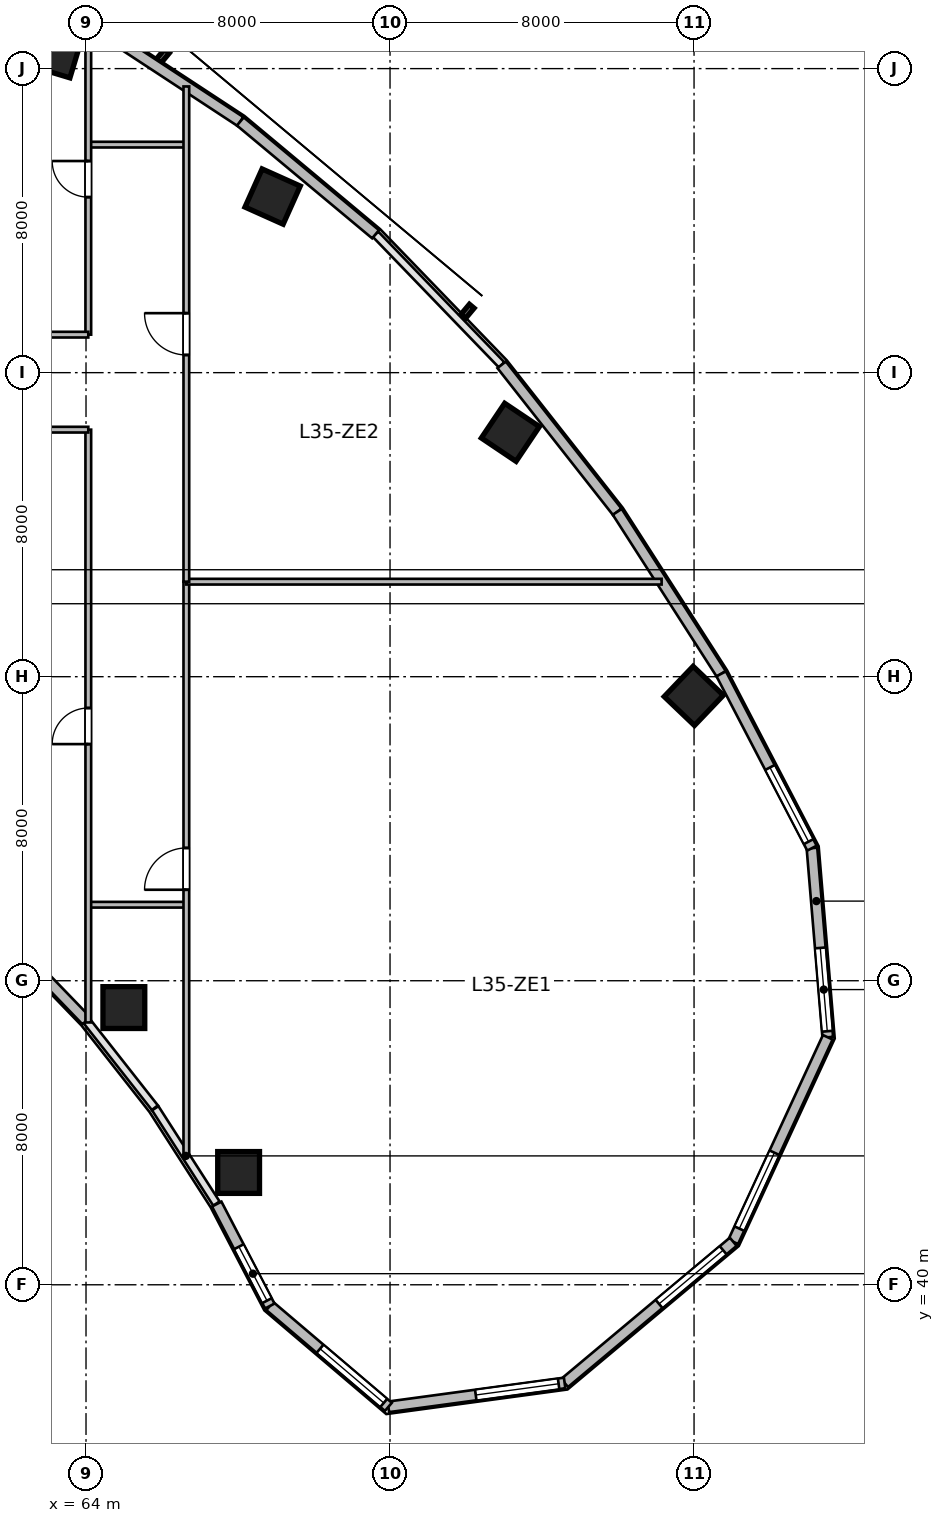
"""IFC4 building model, lengths in metres.
Left out: names, types, materials, properties, quantities, classifications, styles, units other than length and angle.
Written with IfcOpenShell. Run it as: python <this file> out.ifc"""

import sys

from ifc_helpers import new_model, si_unit, direction, frame, frame_2d, origin, origin_2d, place, context, subcontext, project, spatial, rectangle, circle, extrude, source, transform, mapped, element, fill, save


model = new_model("IFC4")
c1 = context("Model", 3, precision=1e-05, world=origin(), true_north=direction((0.0, 1.0)))
c2 = subcontext(c1, "Body", "Model", "MODEL_VIEW")
j1 = project(units=[si_unit("LENGTHUNIT", "METRE"), si_unit("PLANEANGLEUNIT", "RADIAN")], contexts=[c1])
p1 = place(None, origin())
s1 = spatial("IfcSite", under=j1, at=p1, CompositionType="ELEMENT")
p2 = place(p1, origin())
s2 = spatial("IfcBuilding", under=s1, at=p2, CompositionType="ELEMENT")
p3 = place(p2, frame((0.0, 0.0, 146.7)))
s3 = spatial("IfcBuildingStorey", under=s2, at=p3, CompositionType="ELEMENT", Elevation=146.7)
m1 = source(origin(), c2, "Body", "SweptSolid", [
    extrude(rectangle(XDim=1.1, YDim=1.1, at=origin_2d()), origin(), (0.0, 0.0, 1.0), 3.9),
])
for number, where, z_axis, x_axis in (
    (1, (63.209, 72.442, 0.0), (0.0, 0.0, 1.0), (0.289, 0.957, 0.0)),
    (2, (68.91, 68.633, 0.0), (0.0, 0.0, 1.0), (0.409, 0.912, 0.0)),
):
    element("IfcColumn", number, at=place(p3, frame(where, z_axis=z_axis, x_axis=x_axis)), inside=s3, PredefinedType="COLUMN", context=c2, shape_type="MappedRepresentation", body=[
        mapped(m1, transform((0.0, 0.0, 0.0), scale=1.0)),
    ])
m2 = source(origin(), c2, "Body", "SweptSolid", [
    extrude(circle(Radius=0.55, at=origin_2d()), origin(), (0.0, 0.0, 1.0), 3.9),
])
p4 = place(p3, frame((64.996, 47.294, 0.0), z_axis=(0.0, 0.0, 1.0), x_axis=(0.55774510898, 0.830012285095, 0.0)))
e3 = element("IfcColumn", 3, at=p4, inside=s3, PredefinedType="COLUMN", context=c2, shape_type="MappedRepresentation", body=[
    mapped(m2, transform((0.0, 0.0, 0.0), scale=1.0)),
])
p5 = place(p3, frame((75.167, 62.43, 0.0), z_axis=(0.0, 0.0, 1.0), x_axis=(0.55774510898, 0.830012285095, 0.0)))
e4 = element("IfcColumn", 4, at=p5, inside=s3, PredefinedType="COLUMN", context=c2, shape_type="MappedRepresentation", body=[
    mapped(m1, transform((0.0, 0.0, 0.0), scale=1.0)),
])
p6 = place(p3, frame((68.015, 42.955, 0.0), z_axis=(0.0, 0.0, 1.0), x_axis=(0.690756218984, 0.723087716626, 0.0)))
e5 = element("IfcColumn", 5, at=p6, inside=s3, PredefinedType="COLUMN", context=c2, shape_type="MappedRepresentation", body=[
    mapped(m2, transform((0.0, 0.0, 0.0), scale=1.0)),
])
p7 = place(p3, frame((79.993, 55.494, 0.0), z_axis=(0.0, 0.0, 1.0), x_axis=(0.690756218984, 0.723087716626, 0.0)))
e6 = element("IfcColumn", 6, at=p7, inside=s3, PredefinedType="COLUMN", context=c2, shape_type="MappedRepresentation", body=[
    mapped(m1, transform((0.0, 0.0, 0.0), scale=1.0)),
])
m3 = source(origin(), c2, "Body", "SweptSolid", [
    extrude(rectangle(XDim=4.994, YDim=0.28, at=frame_2d((2.497, 0.0))), origin(), (0.0, 0.0, 1.0), 3.65),
])
p8 = place(p3, frame((83.102, 51.489, 0.0), z_axis=(0.0, 0.0, 1.0), x_axis=(0.083344839916, -0.996520766296, 0.0)))
e7 = element("IfcWall", 7, at=p8, inside=s3, PredefinedType="SOLIDWALL", context=c2, shape_type="MappedRepresentation", body=[
    mapped(m3, transform((0.0, 0.0, 0.0), scale=1.0)),
])
p9 = place(p8, frame((2.635, 0.0, 0.95)))
e8 = element("IfcOpeningElement", 8, at=p9, cuts=e7, PredefinedType="OPENING", context=c2, shape_type="SweptSolid", body=[
    extrude(rectangle(XDim=2.2, YDim=2.1, at=frame_2d((1.1, 1.05))), frame((0.0, 0.15, 0.0), z_axis=(0.0, -1.0, 0.0), x_axis=(1.0, 0.0, 0.0)), (0.0, 0.0, 1.0), 0.3),
])
m4 = source(origin(), c2, "Body", "SweptSolid", [
    extrude(rectangle(XDim=5.927, YDim=0.28, at=frame_2d((2.964, 0.0))), origin(), (0.0, 0.0, 1.0), 3.65),
])
p10 = place(p3, frame((83.519, 46.512, 0.0), z_axis=(0.0, 0.0, 1.0), x_axis=(-0.419656204795, -0.907683132914, 0.0)))
e9 = element("IfcWall", 9, at=p10, inside=s3, PredefinedType="SOLIDWALL", context=c2, shape_type="MappedRepresentation", body=[
    mapped(m4, transform((0.0, 0.0, 0.0), scale=1.0)),
])
p11 = place(p10, frame((3.346, 0.0, 0.95)))
e10 = element("IfcOpeningElement", 10, at=p11, cuts=e9, PredefinedType="OPENING", context=c2, shape_type="SweptSolid", body=[
    extrude(rectangle(XDim=2.2, YDim=2.1, at=frame_2d((1.1, 1.05))), frame((0.0, 0.15, 0.0), z_axis=(0.0, -1.0, 0.0), x_axis=(1.0, 0.0, 0.0)), (0.0, 0.0, 1.0), 0.3),
])
m5 = source(origin(), c2, "Body", "SweptSolid", [
    extrude(rectangle(XDim=5.786, YDim=0.28, at=frame_2d((2.893, 0.0))), origin(), (0.0, 0.0, 1.0), 3.65),
])
p12 = place(p3, frame((81.031, 41.131, 0.0), z_axis=(0.0, 0.0, 1.0), x_axis=(-0.766711306852, -0.641992034176, 0.0)))
e11 = element("IfcWall", 11, at=p12, inside=s3, PredefinedType="SOLIDWALL", context=c2, shape_type="MappedRepresentation", body=[
    mapped(m5, transform((0.0, 0.0, 0.0), scale=1.0)),
])
p13 = place(p12, frame((0.347, 0.0, 0.95)))
e12 = element("IfcOpeningElement", 12, at=p13, cuts=e11, PredefinedType="OPENING", context=c2, shape_type="SweptSolid", body=[
    extrude(rectangle(XDim=2.2, YDim=2.1, at=frame_2d((1.1, 1.05))), frame((0.0, 0.15, 0.0), z_axis=(0.0, -1.0, 0.0), x_axis=(1.0, 0.0, 0.0)), (0.0, 0.0, 1.0), 0.3),
])
m6 = source(origin(), c2, "Body", "SweptSolid", [
    extrude(rectangle(XDim=4.68, YDim=0.28, at=frame_2d((2.34, 0.0))), origin(), (0.0, 0.0, 1.0), 3.65),
])
p14 = place(p3, frame((76.594, 37.417, 0.0), z_axis=(0.0, 0.0, 1.0), x_axis=(-0.990931146435, -0.134370618162, 0.0)))
e13 = element("IfcWall", 13, at=p14, inside=s3, PredefinedType="SOLIDWALL", context=c2, shape_type="MappedRepresentation", body=[
    mapped(m6, transform((0.0, 0.0, 0.0), scale=1.0)),
])
p15 = place(p14, frame((0.16, 0.0, 0.95)))
e14 = element("IfcOpeningElement", 14, at=p15, cuts=e13, PredefinedType="OPENING", context=c2, shape_type="SweptSolid", body=[
    extrude(rectangle(XDim=2.2, YDim=2.1, at=frame_2d((1.1, 1.05))), frame((0.0, 0.15, 0.0), z_axis=(0.0, -1.0, 0.0), x_axis=(1.0, 0.0, 0.0)), (0.0, 0.0, 1.0), 0.3),
])
m7 = source(origin(), c2, "Body", "SweptSolid", [
    extrude(rectangle(XDim=4.096, YDim=0.28, at=frame_2d((2.048, 0.0))), origin(), (0.0, 0.0, 1.0), 3.65),
])
p16 = place(p3, frame((71.957, 36.788, 0.0), z_axis=(0.0, 0.0, 1.0), x_axis=(-0.761926081737, 0.647663991564, 0.0)))
e15 = element("IfcWall", 15, at=p16, inside=s3, PredefinedType="SOLIDWALL", context=c2, shape_type="MappedRepresentation", body=[
    mapped(m7, transform((0.0, 0.0, 0.0), scale=1.0)),
])
p17 = place(p16, frame((0.16, 0.0, 0.95)))
e16 = element("IfcOpeningElement", 16, at=p17, cuts=e15, PredefinedType="OPENING", context=c2, shape_type="SweptSolid", body=[
    extrude(rectangle(XDim=2.2, YDim=2.1, at=frame_2d((1.1, 1.05))), frame((0.0, 0.15, 0.0), z_axis=(0.0, -1.0, 0.0), x_axis=(1.0, 0.0, 0.0)), (0.0, 0.0, 1.0), 0.3),
])
m8 = source(origin(), c2, "Body", "SweptSolid", [
    extrude(rectangle(XDim=3.024, YDim=0.28, at=frame_2d((1.512, 0.0))), origin(), (0.0, 0.0, 1.0), 3.65),
])
p18 = place(p3, frame((68.836, 39.44, 0.0), z_axis=(0.0, 0.0, 1.0), x_axis=(-0.461718746531, 0.887026380161, 0.0)))
e17 = element("IfcWall", 17, at=p18, inside=s3, PredefinedType="SOLIDWALL", context=c2, shape_type="MappedRepresentation", body=[
    mapped(m8, transform((0.0, 0.0, 0.0), scale=1.0)),
])
p19 = place(p18, frame((0.16, 0.0, 0.95)))
e18 = element("IfcOpeningElement", 18, at=p19, cuts=e17, PredefinedType="OPENING", context=c2, shape_type="SweptSolid", body=[
    extrude(rectangle(XDim=1.6, YDim=1.9, at=frame_2d((0.8, 0.95))), frame((0.0, 0.15, 0.0), z_axis=(0.0, -1.0, 0.0), x_axis=(1.0, 0.0, 0.0)), (0.0, 0.0, 1.0), 0.3),
])
m9 = source(origin(), c2, "Body", "SweptSolid", [
    extrude(rectangle(XDim=2.812, YDim=0.28, at=frame_2d((1.406, 0.0))), origin(), (0.0, 0.0, 1.0), 3.65),
])
p20 = place(p3, frame((64.008, 46.95, 0.0), z_axis=(0.0, 0.0, 1.0), x_axis=(-0.694583668785, 0.719411931411, 0.0)))
e19 = element("IfcWall", 19, at=p20, inside=s3, PredefinedType="SOLIDWALL", context=c2, shape_type="MappedRepresentation", body=[
    mapped(m9, transform((0.0, 0.0, 0.0), scale=1.0)),
])
m10 = source(origin(), c2, "Body", "SweptSolid", [
    extrude(rectangle(XDim=4.501, YDim=0.28, at=frame_2d((2.25, 0.0))), origin(), (0.0, 0.0, 1.0), 3.65),
])
p21 = place(p3, frame((64.298, 73.08, 0.0), z_axis=(0.0, 0.0, 1.0), x_axis=(0.835984920737, -0.548752414391, 0.0)))
e20 = element("IfcWall", 20, at=p21, inside=s3, PredefinedType="SOLIDWALL", context=c2, shape_type="MappedRepresentation", body=[
    mapped(m10, transform((0.0, 0.0, 0.0), scale=1.0)),
])
m11 = source(origin(), c2, "Body", "SweptSolid", [
    extrude(rectangle(XDim=4.634, YDim=0.28, at=frame_2d((2.317, 0.0))), origin(), (0.0, 0.0, 1.0), 3.65),
])
p22 = place(p3, frame((68.061, 70.61, 0.0), z_axis=(0.0, 0.0, 1.0), x_axis=(0.767910229096, -0.640557475993, 0.0)))
e21 = element("IfcWall", 21, at=p22, inside=s3, PredefinedType="SOLIDWALL", context=c2, shape_type="MappedRepresentation", body=[
    mapped(m11, transform((0.0, 0.0, 0.0), scale=1.0)),
])
m12 = source(origin(), c2, "Body", "SweptSolid", [
    extrude(rectangle(XDim=4.922, YDim=0.28, at=frame_2d((2.461, 0.0))), origin(), (0.0, 0.0, 1.0), 3.65),
])
p23 = place(p3, frame((74.936, 64.206, 0.0), z_axis=(0.0, 0.0, 1.0), x_axis=(0.61817639101, -0.786039407153, 0.0)))
e22 = element("IfcWall", 22, at=p23, inside=s3, PredefinedType="SOLIDWALL", context=c2, shape_type="MappedRepresentation", body=[
    mapped(m12, transform((0.0, 0.0, 0.0), scale=1.0)),
])
m13 = source(origin(), c2, "Body", "SweptSolid", [
    extrude(rectangle(XDim=5.065, YDim=0.28, at=frame_2d((2.532, 0.0))), origin(), (0.0, 0.0, 1.0), 3.65),
])
p24 = place(p3, frame((77.979, 60.338, 0.0), z_axis=(0.0, 0.0, 1.0), x_axis=(0.540177618806, -0.841551032404, 0.0)))
e23 = element("IfcWall", 23, at=p24, inside=s3, PredefinedType="SOLIDWALL", context=c2, shape_type="MappedRepresentation", body=[
    mapped(m13, transform((0.0, 0.0, 0.0), scale=1.0)),
])
m14 = source(origin(), c2, "Body", "SweptSolid", [
    extrude(rectangle(XDim=5.171, YDim=0.28, at=frame_2d((2.585, 0.0))), origin(), (0.0, 0.0, 1.0), 3.65),
])
p25 = place(p3, frame((80.715, 56.075, 0.0), z_axis=(0.0, 0.0, 1.0), x_axis=(0.461752581363, -0.887008767491, 0.0)))
e24 = element("IfcWall", 24, at=p25, inside=s3, PredefinedType="SOLIDWALL", context=c2, shape_type="MappedRepresentation", body=[
    mapped(m14, transform((0.0, 0.0, 0.0), scale=1.0)),
])
p26 = place(p25, frame((2.778, 0.0, 0.95)))
e25 = element("IfcOpeningElement", 25, at=p26, cuts=e24, PredefinedType="OPENING", context=c2, shape_type="SweptSolid", body=[
    extrude(rectangle(XDim=2.2, YDim=2.1, at=frame_2d((1.1, 1.05))), frame((0.0, 0.15, 0.0), z_axis=(0.0, -1.0, 0.0), x_axis=(1.0, 0.0, 0.0)), (0.0, 0.0, 1.0), 0.3),
])
m15 = source(origin(), c2, "Body", "SweptSolid", [
    extrude(rectangle(XDim=2.5, YDim=0.15, at=frame_2d((1.25, 0.0))), origin(), (0.0, 0.0, 1.0), 3.65),
])
for number, where, z_axis, x_axis in (
    (26, (64.1, 50.0, 0.0), (0.0, 0.0, 1.0), (1.0, 0.0, 0.0)),
    (27, (64.1, 70.0, 0.0), (0.0, 0.0, 1.0), (1.0, 0.0, 0.0)),
):
    element("IfcWall", number, at=place(p3, frame(where, z_axis=z_axis, x_axis=x_axis)), inside=s3, PredefinedType="PARTITIONING", context=c2, shape_type="MappedRepresentation", body=[
        mapped(m15, transform((0.0, 0.0, 0.0), scale=1.0)),
    ])
m16 = source(origin(), c2, "Body", "SweptSolid", [
    extrude(rectangle(XDim=15.112, YDim=0.15, at=frame_2d((7.556, 0.0))), origin(), (0.0, 0.0, 1.0), 2.942),
])
p27 = place(p3, frame((66.64, 43.388, 0.0), z_axis=(0.0, 0.0, 1.0), x_axis=(0.0, 1.0, 0.0)))
e28 = element("IfcWall", 28, at=p27, inside=s3, PredefinedType="PARTITIONING", context=c2, shape_type="MappedRepresentation", body=[
    mapped(m16, transform((0.0, 0.0, 0.0), scale=1.0)),
])
p28 = place(p27, frame((7.006, 0.0, 0.0)))
e29 = element("IfcOpeningElement", 29, at=p28, cuts=e28, PredefinedType="OPENING", context=c2, shape_type="SweptSolid", body=[
    extrude(rectangle(XDim=1.1, YDim=2.15, at=frame_2d((0.55, 1.075))), frame((0.0, 0.085, 0.0), z_axis=(0.0, -1.0, 0.0), x_axis=(1.0, 0.0, 0.0)), (0.0, 0.0, 1.0), 0.17),
])
m17 = source(origin(), c2, "Body", "SweptSolid", [
    extrude(rectangle(XDim=12.507, YDim=0.15, at=frame_2d((6.253, 0.0))), origin(), (0.0, 0.0, 1.0), 3.65),
])
p29 = place(p3, frame((66.64, 58.5, 0.0), z_axis=(0.0, 0.0, 1.0), x_axis=(1.0, 0.0, 0.0)))
e30 = element("IfcWall", 30, at=p29, inside=s3, PredefinedType="PARTITIONING", context=c2, shape_type="MappedRepresentation", body=[
    mapped(m17, transform((0.0, 0.0, 0.0), scale=1.0)),
])
m18 = source(origin(), c2, "Body", "SweptSolid", [
    extrude(rectangle(XDim=13.031, YDim=0.15, at=frame_2d((6.515, 0.0))), origin(), (0.0, 0.0, 1.0), 2.942),
])
p30 = place(p3, frame((66.64, 58.5, 0.0), z_axis=(0.0, 0.0, 1.0), x_axis=(0.0, 1.0, 0.0)))
e31 = element("IfcWall", 31, at=p30, inside=s3, PredefinedType="PARTITIONING", context=c2, shape_type="MappedRepresentation", body=[
    mapped(m18, transform((0.0, 0.0, 0.0), scale=1.0)),
])
p31 = place(p30, frame((5.965, 0.0, 0.0)))
e32 = element("IfcOpeningElement", 32, at=p31, cuts=e31, PredefinedType="OPENING", context=c2, shape_type="SweptSolid", body=[
    extrude(rectangle(XDim=1.1, YDim=2.15, at=frame_2d((0.55, 1.075))), frame((0.0, 0.085, 0.0), z_axis=(0.0, -1.0, 0.0), x_axis=(1.0, 0.0, 0.0)), (0.0, 0.0, 1.0), 0.17),
])
m19 = source(origin(), c2, "Body", "SweptSolid", [
    extrude(rectangle(XDim=15.598, YDim=0.15, at=frame_2d((7.799, 0.0))), origin(), (0.0, 0.0, 1.0), 2.942),
])
p32 = place(p3, frame((64.06, 46.902, 0.0), z_axis=(0.0, 0.0, 1.0), x_axis=(0.0, 1.0, 0.0)))
e33 = element("IfcWall", 33, at=p32, inside=s3, PredefinedType="PARTITIONING", context=c2, shape_type="MappedRepresentation", body=[
    mapped(m19, transform((0.0, 0.0, 0.0), scale=1.0)),
])
p33 = place(p32, frame((7.324, 0.0, 0.0)))
e34 = element("IfcOpeningElement", 34, at=p33, cuts=e33, PredefinedType="OPENING", context=c2, shape_type="SweptSolid", body=[
    extrude(rectangle(XDim=0.95, YDim=2.1, at=frame_2d((0.475, 1.05))), frame((0.0, 0.085, 0.0), z_axis=(0.0, -1.0, 0.0), x_axis=(1.0, 0.0, 0.0)), (0.0, 0.0, 1.0), 0.17),
])
m20 = source(origin(), c2, "Body", "SweptSolid", [
    extrude(rectangle(XDim=4.56, YDim=0.15, at=frame_2d((2.28, 0.0))), origin(), (0.0, 0.0, 1.0), 3.65),
])
p34 = place(p3, frame((59.5, 62.5, 0.0), z_axis=(0.0, 0.0, 1.0), x_axis=(1.0, 0.0, 0.0)))
e35 = element("IfcWall", 35, at=p34, inside=s3, PredefinedType="PARTITIONING", context=c2, shape_type="MappedRepresentation", body=[
    mapped(m20, transform((0.0, 0.0, 0.0), scale=1.0)),
])
m21 = source(origin(), c2, "Body", "SweptSolid", [
    extrude(rectangle(XDim=8.187, YDim=0.15, at=frame_2d((4.093, 0.0))), origin(), (0.0, 0.0, 1.0), 3.65),
])
p35 = place(p3, frame((64.06, 65.0, 0.0), z_axis=(0.0, 0.0, 1.0), x_axis=(0.0, 1.0, 0.0)))
e36 = element("IfcWall", 36, at=p35, inside=s3, PredefinedType="PARTITIONING", context=c2, shape_type="MappedRepresentation", body=[
    mapped(m21, transform((0.0, 0.0, 0.0), scale=1.0)),
])
p36 = place(p35, frame((3.618, 0.0, 0.0)))
e37 = element("IfcOpeningElement", 37, at=p36, cuts=e36, PredefinedType="OPENING", context=c2, shape_type="SweptSolid", body=[
    extrude(rectangle(XDim=0.95, YDim=2.1, at=frame_2d((0.475, 1.05))), frame((0.0, 0.085, 0.0), z_axis=(0.0, -1.0, 0.0), x_axis=(1.0, 0.0, 0.0)), (0.0, 0.0, 1.0), 0.17),
])
m22 = source(origin(), c2, "Body", "SweptSolid", [
    extrude(rectangle(XDim=2.46, YDim=0.15, at=frame_2d((1.23, 0.0))), origin(), (0.0, 0.0, 1.0), 3.65),
])
p37 = place(p3, frame((61.6, 65.0, 0.0), z_axis=(0.0, 0.0, 1.0), x_axis=(1.0, 0.0, 0.0)))
e38 = element("IfcWall", 38, at=p37, inside=s3, PredefinedType="PARTITIONING", context=c2, shape_type="MappedRepresentation", body=[
    mapped(m22, transform((0.0, 0.0, 0.0), scale=1.0)),
])
m23 = source(origin(), c2, "Body", "SweptSolid", [
    extrude(rectangle(XDim=2.2, YDim=2.1, at=frame_2d((1.1, 1.05))), frame((0.0, 0.03, 0.0), z_axis=(0.0, -1.0, 0.0), x_axis=(1.0, 0.0, 0.0)), (0.0, 0.0, 1.0), 0.06),
])
p38 = place(p9, origin())
e39 = element("IfcWindow", 39, at=p38, inside=s3, PartitioningType="TRIPLE_PANEL_VERTICAL", PredefinedType="WINDOW", context=c2, shape_type="MappedRepresentation", body=[
    mapped(m23, transform((0.0, 0.0, 0.0), scale=1.0)),
])
fill(e8, e39)
p39 = place(p11, origin())
e40 = element("IfcWindow", 40, at=p39, inside=s3, PartitioningType="TRIPLE_PANEL_VERTICAL", PredefinedType="WINDOW", context=c2, shape_type="MappedRepresentation", body=[
    mapped(m23, transform((0.0, 0.0, 0.0), scale=1.0)),
])
fill(e10, e40)
p40 = place(p13, origin())
e41 = element("IfcWindow", 41, at=p40, inside=s3, PartitioningType="TRIPLE_PANEL_VERTICAL", PredefinedType="WINDOW", context=c2, shape_type="MappedRepresentation", body=[
    mapped(m23, transform((0.0, 0.0, 0.0), scale=1.0)),
])
fill(e12, e41)
p41 = place(p15, origin())
e42 = element("IfcWindow", 42, at=p41, inside=s3, PartitioningType="TRIPLE_PANEL_VERTICAL", PredefinedType="WINDOW", context=c2, shape_type="MappedRepresentation", body=[
    mapped(m23, transform((0.0, 0.0, 0.0), scale=1.0)),
])
fill(e14, e42)
p42 = place(p17, origin())
e43 = element("IfcWindow", 43, at=p42, inside=s3, PartitioningType="TRIPLE_PANEL_VERTICAL", PredefinedType="WINDOW", context=c2, shape_type="MappedRepresentation", body=[
    mapped(m23, transform((0.0, 0.0, 0.0), scale=1.0)),
])
fill(e16, e43)
m24 = source(origin(), c2, "Body", "SweptSolid", [
    extrude(rectangle(XDim=1.6, YDim=1.9, at=frame_2d((0.8, 0.95))), frame((0.0, 0.03, 0.0), z_axis=(0.0, -1.0, 0.0), x_axis=(1.0, 0.0, 0.0)), (0.0, 0.0, 1.0), 0.06),
])
p43 = place(p19, origin())
e44 = element("IfcWindow", 44, at=p43, inside=s3, PartitioningType="SINGLE_PANEL", PredefinedType="WINDOW", context=c2, shape_type="MappedRepresentation", body=[
    mapped(m24, transform((0.0, 0.0, 0.0), scale=1.0)),
])
fill(e18, e44)
p44 = place(p26, origin())
e45 = element("IfcWindow", 45, at=p44, inside=s3, PartitioningType="TRIPLE_PANEL_VERTICAL", PredefinedType="WINDOW", context=c2, shape_type="MappedRepresentation", body=[
    mapped(m23, transform((0.0, 0.0, 0.0), scale=1.0)),
])
fill(e25, e45)
m25 = source(origin(), c2, "Body", "SweptSolid", [
    extrude(rectangle(XDim=1.1, YDim=2.15, at=frame_2d((0.55, 1.075))), frame((0.0, 0.025, 0.0), z_axis=(0.0, -1.0, 0.0), x_axis=(1.0, 0.0, 0.0)), (0.0, 0.0, 1.0), 0.05),
])
p45 = place(p28, origin())
e46 = element("IfcDoor", 46, at=p45, inside=s3, OperationType="SINGLE_SWING_LEFT", PredefinedType="DOOR", context=c2, shape_type="MappedRepresentation", body=[
    mapped(m25, transform((0.0, 0.0, 0.0), scale=1.0)),
])
fill(e29, e46)
p46 = place(p31, origin())
e47 = element("IfcDoor", 47, at=p46, inside=s3, OperationType="SINGLE_SWING_RIGHT", PredefinedType="DOOR", context=c2, shape_type="MappedRepresentation", body=[
    mapped(m25, transform((0.0, 0.0, 0.0), scale=1.0)),
])
fill(e32, e47)
m26 = source(origin(), c2, "Body", "SweptSolid", [
    extrude(rectangle(XDim=0.95, YDim=2.1, at=frame_2d((0.475, 1.05))), frame((0.0, 0.025, 0.0), z_axis=(0.0, -1.0, 0.0), x_axis=(1.0, 0.0, 0.0)), (0.0, 0.0, 1.0), 0.05),
])
p47 = place(p33, origin())
e48 = element("IfcDoor", 48, at=p47, inside=s3, OperationType="SINGLE_SWING_LEFT", PredefinedType="DOOR", context=c2, shape_type="MappedRepresentation", body=[
    mapped(m26, transform((0.0, 0.0, 0.0), scale=1.0)),
])
fill(e34, e48)
p48 = place(p36, origin())
e49 = element("IfcDoor", 49, at=p48, inside=s3, OperationType="SINGLE_SWING_RIGHT", PredefinedType="DOOR", context=c2, shape_type="MappedRepresentation", body=[
    mapped(m26, transform((0.0, 0.0, 0.0), scale=1.0)),
])
fill(e37, e49)
save(model, sys.argv[1])
